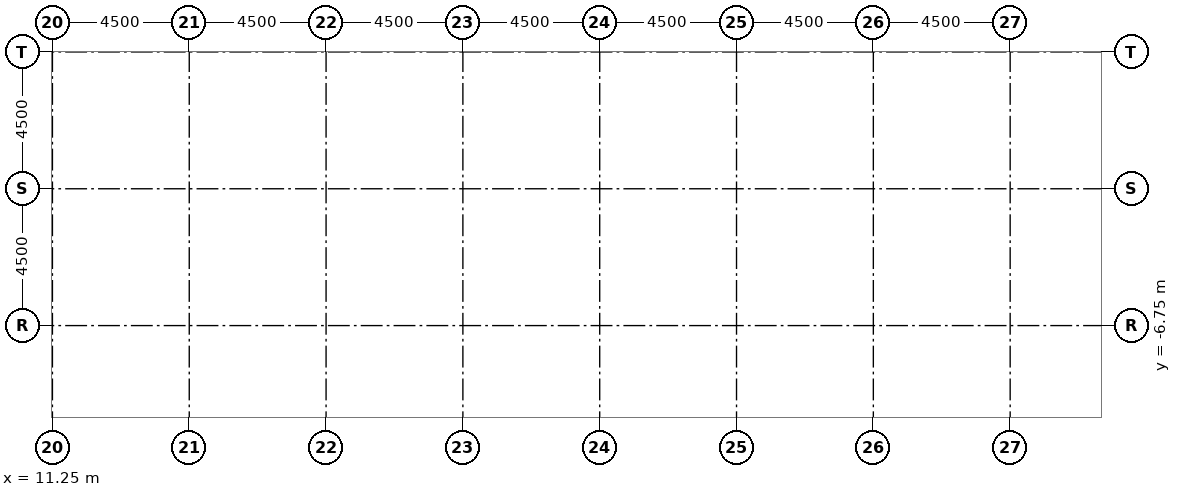
"""IFC4 building model, lengths in metres.
Left out: names, types, materials, properties, quantities, classifications, styles, units other than length and angle.
Written with IfcOpenShell. Run it as: python <this file> out.ifc"""

import sys

from ifc_helpers import new_model, si_unit, direction, frame, origin, origin_2d, place, context, subcontext, project, spatial, rectangle, extrude, element, save


model = new_model("IFC4")
c1 = context("Model", 3, precision=1e-05, world=origin(), true_north=direction((0.0, 1.0)))
c2 = subcontext(c1, "Body", "Model", "MODEL_VIEW")
j1 = project(units=[si_unit("LENGTHUNIT", "METRE"), si_unit("PLANEANGLEUNIT", "RADIAN")], contexts=[c1])
p1 = place(None, origin())
s1 = spatial("IfcSite", under=j1, at=p1, CompositionType="ELEMENT")
p2 = place(p1, origin())
s2 = spatial("IfcBuilding", under=s1, at=p2, CompositionType="ELEMENT")
p3 = place(p2, frame((0.0, 0.0, -8.0)))
s3 = spatial("IfcBuildingStorey", under=s2, at=p3, CompositionType="ELEMENT", Elevation=-8.0)
for number, where, z_axis, x_axis in (
    (1, (10.75, -6.25, 0.0), (0.0, 0.0, 1.0), (1.0, 0.0, 0.0)),
    (2, (15.75, -6.25, 0.0), (0.0, 0.0, 1.0), (1.0, 0.0, 0.0)),
    (3, (20.25, -6.11, 0.0), (0.0, 0.0, 1.0), (1.0, 0.0, 0.0)),
    (4, (24.75, -6.11, 0.0), (0.0, 0.0, 1.0), (1.0, 0.0, 0.0)),
    (5, (28.908, -5.475, 0.0), (0.0, 0.0, 1.0), (1.0, 0.0, 0.0)),
    (6, (28.67, -2.25, 0.0), (0.0, 0.0, 1.0), (1.0, 0.0, 0.0)),
    (7, (28.67, 2.25, 0.0), (0.0, 0.0, 1.0), (1.0, 0.0, 0.0)),
    (8, (33.11, -2.25, 0.0), (0.0, 0.0, 1.0), (1.0, 0.0, 0.0)),
    (9, (33.11, 2.25, 0.0), (0.0, 0.0, 1.0), (1.0, 0.0, 0.0)),
):
    element("IfcColumn", number, at=place(p3, frame(where, z_axis=z_axis, x_axis=x_axis)), inside=s3, PredefinedType="COLUMN", context=c2, shape_type="SweptSolid", body=[
        extrude(rectangle(XDim=1.2, YDim=1.2, at=origin_2d()), origin(), (0.0, 0.0, 1.0), 3.4),
    ])
save(model, sys.argv[1])
